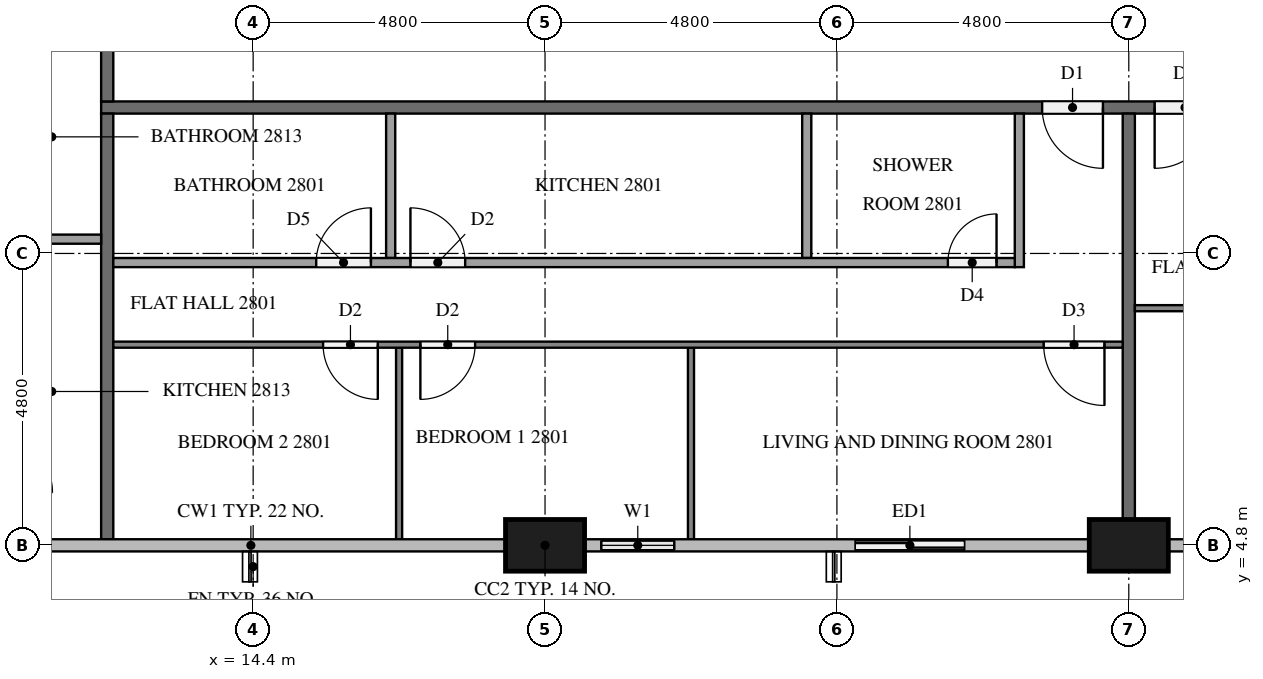
"""IFC4 building model, lengths in metres.
Left out: names, types, materials, properties, quantities, classifications, styles, units other than length and angle.
Written with IfcOpenShell. Run it as: python <this file> out.ifc"""

import sys

from ifc_helpers import new_model, si_unit, direction, frame, frame_2d, origin, origin_2d, place, context, subcontext, project, spatial, rectangle, extrude, element, fill, save


model = new_model("IFC4")
c1 = context("Model", 3, precision=1e-05, world=origin(), true_north=direction((0.0, 1.0)))
c2 = subcontext(c1, "Body", "Model", "MODEL_VIEW")
j1 = project(units=[si_unit("LENGTHUNIT", "METRE"), si_unit("PLANEANGLEUNIT", "RADIAN")], contexts=[c1])
p1 = place(None, origin())
s1 = spatial("IfcSite", under=j1, at=p1, CompositionType="ELEMENT")
p2 = place(p1, origin())
s2 = spatial("IfcBuilding", under=s1, at=p2, CompositionType="ELEMENT")
p3 = place(p2, frame((0.0, 0.0, 110.2)))
s3 = spatial("IfcBuildingStorey", under=s2, at=p3, CompositionType="ELEMENT", Elevation=110.2)
for number, where, z_axis, x_axis in (
    (1, (19.2, 4.8, 0.0), (0.0, 0.0, 1.0), (1.0, 0.0, 0.0)),
    (2, (28.8, 4.8, 0.0), (0.0, 0.0, 1.0), (1.0, 0.0, 0.0)),
):
    element("IfcColumn", number, at=place(p3, frame(where, z_axis=z_axis, x_axis=x_axis)), inside=s3, PredefinedType="COLUMN", context=c2, shape_type="SweptSolid", body=[
        extrude(rectangle(XDim=1.3, YDim=0.85, at=origin_2d()), origin(), (0.0, 0.0, 1.0), 3.1),
    ])
p4 = place(p3, frame((19.85, 4.8, 0.0), z_axis=(0.0, 0.0, 1.0), x_axis=(1.0, 0.0, 0.0)))
e3 = element("IfcWall", 3, at=p4, inside=s3, PredefinedType="SOLIDWALL", context=c2, shape_type="SweptSolid", body=[
    extrude(rectangle(XDim=1.75, YDim=0.15, at=frame_2d((0.875, 0.0))), origin(), (0.0, 0.0, 1.0), 3.1),
])
p5 = place(p4, frame((0.275, 0.0, 0.9)))
e4 = element("IfcOpeningElement", 4, at=p5, cuts=e3, PredefinedType="OPENING", context=c2, shape_type="SweptSolid", body=[
    extrude(rectangle(XDim=1.2, YDim=1.4, at=frame_2d((0.6, 0.7))), frame((0.0, 0.085, 0.0), z_axis=(0.0, -1.0, 0.0), x_axis=(1.0, 0.0, 0.0)), (0.0, 0.0, 1.0), 0.17),
])
p6 = place(p3, frame((24.0, 4.8, 0.0), z_axis=(0.0, 0.0, 1.0), x_axis=(1.0, 0.0, 0.0)))
e5 = element("IfcWall", 5, at=p6, inside=s3, PredefinedType="SOLIDWALL", context=c2, shape_type="SweptSolid", body=[
    extrude(rectangle(XDim=2.4, YDim=0.15, at=frame_2d((1.2, 0.0))), origin(), (0.0, 0.0, 1.0), 3.1),
])
p7 = place(p6, frame((0.3, 0.0, 0.0)))
e6 = element("IfcOpeningElement", 6, at=p7, cuts=e5, PredefinedType="OPENING", context=c2, shape_type="SweptSolid", body=[
    extrude(rectangle(XDim=1.8, YDim=2.4, at=frame_2d((0.9, 1.2))), frame((0.0, 0.085, 0.0), z_axis=(0.0, -1.0, 0.0), x_axis=(1.0, 0.0, 0.0)), (0.0, 0.0, 1.0), 0.17),
])
p8 = place(p3, frame((50.5, 12.0, 0.0), z_axis=(0.0, 0.0, 1.0), x_axis=(-1.0, 0.0, 0.0)))
e7 = element("IfcWall", 7, at=p8, inside=s3, PredefinedType="PARTITIONING", context=c2, shape_type="SweptSolid", body=[
    extrude(rectangle(XDim=38.6, YDim=0.2, at=frame_2d((19.3, 0.0))), origin(), (0.0, 0.0, 1.0), 3.1),
])
p9 = place(p8, frame((22.125, 0.0, 0.0)))
e8 = element("IfcOpeningElement", 8, at=p9, cuts=e7, PredefinedType="OPENING", context=c2, shape_type="SweptSolid", body=[
    extrude(rectangle(XDim=1.0, YDim=2.1, at=frame_2d((0.5, 1.05))), frame((0.0, 0.11, 0.0), z_axis=(0.0, -1.0, 0.0), x_axis=(1.0, 0.0, 0.0)), (0.0, 0.0, 1.0), 0.22),
])
p10 = place(p8, frame((20.275, 0.0, 0.0)))
e9 = element("IfcOpeningElement", 9, at=p10, cuts=e7, PredefinedType="OPENING", context=c2, shape_type="SweptSolid", body=[
    extrude(rectangle(XDim=1.0, YDim=2.1, at=frame_2d((0.5, 1.05))), frame((0.0, 0.11, 0.0), z_axis=(0.0, -1.0, 0.0), x_axis=(1.0, 0.0, 0.0)), (0.0, 0.0, 1.0), 0.22),
])
p11 = place(p8, frame((0.525, 0.0, 0.0)))
e10 = element("IfcOpeningElement", 10, at=p11, cuts=e7, PredefinedType="OPENING", context=c2, shape_type="SweptSolid", body=[
    extrude(rectangle(XDim=1.0, YDim=2.1, at=frame_2d((0.5, 1.05))), frame((0.0, 0.11, 0.0), z_axis=(0.0, -1.0, 0.0), x_axis=(1.0, 0.0, 0.0)), (0.0, 0.0, 1.0), 0.22),
])
p12 = place(p3, frame((12.0, 12.1, 0.0), z_axis=(0.0, 0.0, 1.0), x_axis=(0.0, 1.0, 0.0)))
e11 = element("IfcWall", 11, at=p12, inside=s3, PredefinedType="PARTITIONING", context=c2, shape_type="SweptSolid", body=[
    extrude(rectangle(XDim=2.8, YDim=0.2, at=frame_2d((1.4, 0.0))), origin(), (0.0, 0.0, 1.0), 3.1),
])
p13 = place(p12, frame((1.475, 0.0, 0.0)))
e12 = element("IfcOpeningElement", 12, at=p13, cuts=e11, PredefinedType="OPENING", context=c2, shape_type="SweptSolid", body=[
    extrude(rectangle(XDim=1.0, YDim=2.1, at=frame_2d((0.5, 1.05))), frame((0.0, 0.11, 0.0), z_axis=(0.0, -1.0, 0.0), x_axis=(1.0, 0.0, 0.0)), (0.0, 0.0, 1.0), 0.22),
])
p14 = place(p3, frame((28.8, 11.9, 0.0), z_axis=(0.0, 0.0, 1.0), x_axis=(0.0, -1.0, 0.0)))
e13 = element("IfcWall", 13, at=p14, inside=s3, PredefinedType="PARTITIONING", context=c2, shape_type="SweptSolid", body=[
    extrude(rectangle(XDim=6.675, YDim=0.2, at=frame_2d((3.337, 0.0))), origin(), (0.0, 0.0, 1.0), 3.1),
])
p15 = place(p3, frame((12.0, 4.9, 0.0), z_axis=(0.0, 0.0, 1.0), x_axis=(0.0, 1.0, 0.0)))
e14 = element("IfcWall", 14, at=p15, inside=s3, PredefinedType="PARTITIONING", context=c2, shape_type="SweptSolid", body=[
    extrude(rectangle(XDim=7.0, YDim=0.2, at=frame_2d((3.5, 0.0))), origin(), (0.0, 0.0, 1.0), 3.1),
])
for number, where, z_axis, x_axis in (
    (15, (21.6, 8.05, 0.0), (0.0, 0.0, 1.0), (0.0, -1.0, 0.0)),
    (16, (16.8, 8.05, 0.0), (0.0, 0.0, 1.0), (0.0, -1.0, 0.0)),
):
    element("IfcWall", number, at=place(p3, frame(where, z_axis=z_axis, x_axis=x_axis)), inside=s3, PredefinedType="PARTITIONING", context=c2, shape_type="SweptSolid", body=[
        extrude(rectangle(XDim=3.15, YDim=0.1, at=frame_2d((1.575, 0.0))), origin(), (0.0, 0.0, 1.0), 3.1),
    ])
p16 = place(p3, frame((28.7, 8.1, 0.0), z_axis=(0.0, 0.0, 1.0), x_axis=(-1.0, 0.0, 0.0)))
e17 = element("IfcWall", 17, at=p16, inside=s3, PredefinedType="PARTITIONING", context=c2, shape_type="SweptSolid", body=[
    extrude(rectangle(XDim=16.6, YDim=0.1, at=frame_2d((8.3, 0.0))), origin(), (0.0, 0.0, 1.0), 3.1),
])
p17 = place(p16, frame((0.3, 0.0, 0.0)))
e18 = element("IfcOpeningElement", 18, at=p17, cuts=e17, PredefinedType="OPENING", context=c2, shape_type="SweptSolid", body=[
    extrude(rectangle(XDim=1.0, YDim=2.1, at=frame_2d((0.5, 1.05))), frame((0.0, 0.06, 0.0), z_axis=(0.0, -1.0, 0.0), x_axis=(1.0, 0.0, 0.0)), (0.0, 0.0, 1.0), 0.12),
])
p18 = place(p16, frame((10.65, 0.0, 0.0)))
e19 = element("IfcOpeningElement", 19, at=p18, cuts=e17, PredefinedType="OPENING", context=c2, shape_type="SweptSolid", body=[
    extrude(rectangle(XDim=0.9, YDim=2.1, at=frame_2d((0.45, 1.05))), frame((0.0, 0.06, 0.0), z_axis=(0.0, -1.0, 0.0), x_axis=(1.0, 0.0, 0.0)), (0.0, 0.0, 1.0), 0.12),
])
p19 = place(p16, frame((12.25, 0.0, 0.0)))
e20 = element("IfcOpeningElement", 20, at=p19, cuts=e17, PredefinedType="OPENING", context=c2, shape_type="SweptSolid", body=[
    extrude(rectangle(XDim=0.9, YDim=2.1, at=frame_2d((0.45, 1.05))), frame((0.0, 0.06, 0.0), z_axis=(0.0, -1.0, 0.0), x_axis=(1.0, 0.0, 0.0)), (0.0, 0.0, 1.0), 0.12),
])
for number, where, z_axis, x_axis in (
    (21, (23.504, 11.9, 0.0), (0.0, 0.0, 1.0), (0.0, -1.0, 0.0)),
    (22, (16.662, 11.9, 0.0), (0.0, 0.0, 1.0), (0.0, -1.0, 0.0)),
):
    element("IfcWall", number, at=place(p3, frame(where, z_axis=z_axis, x_axis=x_axis)), inside=s3, PredefinedType="PARTITIONING", context=c2, shape_type="SweptSolid", body=[
        extrude(rectangle(XDim=2.375, YDim=0.15, at=frame_2d((1.188, 0.0))), origin(), (0.0, 0.0, 1.0), 3.1),
    ])
p20 = place(p3, frame((27.0, 11.9, 0.0), z_axis=(0.0, 0.0, 1.0), x_axis=(0.0, -1.0, 0.0)))
e23 = element("IfcWall", 23, at=p20, inside=s3, PredefinedType="PARTITIONING", context=c2, shape_type="SweptSolid", body=[
    extrude(rectangle(XDim=2.525, YDim=0.15, at=frame_2d((1.262, 0.0))), origin(), (0.0, 0.0, 1.0), 3.1),
])
p21 = place(p3, frame((12.1, 9.45, 0.0), z_axis=(0.0, 0.0, 1.0), x_axis=(1.0, 0.0, 0.0)))
e24 = element("IfcWall", 24, at=p21, inside=s3, PredefinedType="PARTITIONING", context=c2, shape_type="SweptSolid", body=[
    extrude(rectangle(XDim=14.825, YDim=0.15, at=frame_2d((7.413, 0.0))), origin(), (0.0, 0.0, 1.0), 3.1),
])
p22 = place(p21, frame((13.725, 0.0, 0.0)))
e25 = element("IfcOpeningElement", 25, at=p22, cuts=e24, PredefinedType="OPENING", context=c2, shape_type="SweptSolid", body=[
    extrude(rectangle(XDim=0.8, YDim=2.1, at=frame_2d((0.4, 1.05))), frame((0.0, 0.085, 0.0), z_axis=(0.0, -1.0, 0.0), x_axis=(1.0, 0.0, 0.0)), (0.0, 0.0, 1.0), 0.17),
])
p23 = place(p21, frame((4.886, 0.0, 0.0)))
e26 = element("IfcOpeningElement", 26, at=p23, cuts=e24, PredefinedType="OPENING", context=c2, shape_type="SweptSolid", body=[
    extrude(rectangle(XDim=0.9, YDim=2.1, at=frame_2d((0.45, 1.05))), frame((0.0, 0.085, 0.0), z_axis=(0.0, -1.0, 0.0), x_axis=(1.0, 0.0, 0.0)), (0.0, 0.0, 1.0), 0.17),
])
p24 = place(p21, frame((3.336, 0.0, 0.0)))
e27 = element("IfcOpeningElement", 27, at=p24, cuts=e24, PredefinedType="OPENING", context=c2, shape_type="SweptSolid", body=[
    extrude(rectangle(XDim=0.9, YDim=2.1, at=frame_2d((0.45, 1.05))), frame((0.0, 0.085, 0.0), z_axis=(0.0, -1.0, 0.0), x_axis=(1.0, 0.0, 0.0)), (0.0, 0.0, 1.0), 0.17),
])
p25 = place(p3, frame((38.3, 8.7, 0.0), z_axis=(0.0, 0.0, 1.0), x_axis=(-1.0, 0.0, 0.0)))
e28 = element("IfcWall", 28, at=p25, inside=s3, PredefinedType="PARTITIONING", context=c2, shape_type="SweptSolid", body=[
    extrude(rectangle(XDim=9.4, YDim=0.1, at=frame_2d((4.7, 0.0))), origin(), (0.0, 0.0, 1.0), 3.1),
])
p26 = place(p25, frame((5.05, 0.0, 0.0)))
e29 = element("IfcOpeningElement", 29, at=p26, cuts=e28, PredefinedType="OPENING", context=c2, shape_type="SweptSolid", body=[
    extrude(rectangle(XDim=1.0, YDim=2.1, at=frame_2d((0.5, 1.05))), frame((0.0, 0.06, 0.0), z_axis=(0.0, -1.0, 0.0), x_axis=(1.0, 0.0, 0.0)), (0.0, 0.0, 1.0), 0.12),
])
p27 = place(p25, frame((3.45, 0.0, 0.0)))
e30 = element("IfcOpeningElement", 30, at=p27, cuts=e28, PredefinedType="OPENING", context=c2, shape_type="SweptSolid", body=[
    extrude(rectangle(XDim=0.9, YDim=2.1, at=frame_2d((0.45, 1.05))), frame((0.0, 0.06, 0.0), z_axis=(0.0, -1.0, 0.0), x_axis=(1.0, 0.0, 0.0)), (0.0, 0.0, 1.0), 0.12),
])
p28 = place(p3, frame((11.9, 9.835, 0.0), z_axis=(0.0, 0.0, 1.0), x_axis=(-1.0, 0.0, 0.0)))
e31 = element("IfcWall", 31, at=p28, inside=s3, PredefinedType="PARTITIONING", context=c2, shape_type="SweptSolid", body=[
    extrude(rectangle(XDim=1.625, YDim=0.15, at=frame_2d((0.812, 0.0))), origin(), (0.0, 0.0, 1.0), 3.1),
])
p29 = place(p5, origin())
e32 = element("IfcWindow", 32, at=p29, inside=s3, PartitioningType="SINGLE_PANEL", PredefinedType="WINDOW", context=c2, shape_type="SweptSolid", body=[
    extrude(rectangle(XDim=1.2, YDim=1.4, at=frame_2d((0.6, 0.7))), frame((0.0, 0.03, 0.0), z_axis=(0.0, -1.0, 0.0), x_axis=(1.0, 0.0, 0.0)), (0.0, 0.0, 1.0), 0.06),
])
fill(e4, e32)
p30 = place(p7, origin())
e33 = element("IfcDoor", 33, at=p30, inside=s3, OperationType="SLIDING_TO_LEFT", PredefinedType="DOOR", context=c2, shape_type="SweptSolid", body=[
    extrude(rectangle(XDim=1.8, YDim=2.4, at=frame_2d((0.9, 1.2))), frame((0.0, 0.025, 0.0), z_axis=(0.0, -1.0, 0.0), x_axis=(1.0, 0.0, 0.0)), (0.0, 0.0, 1.0), 0.05),
])
fill(e6, e33)
p31 = place(p9, origin())
e34 = element("IfcDoor", 34, at=p31, inside=s3, OperationType="SINGLE_SWING_LEFT", PredefinedType="DOOR", context=c2, shape_type="SweptSolid", body=[
    extrude(rectangle(XDim=1.0, YDim=2.1, at=frame_2d((0.5, 1.05))), frame((0.0, 0.025, 0.0), z_axis=(0.0, -1.0, 0.0), x_axis=(1.0, 0.0, 0.0)), (0.0, 0.0, 1.0), 0.05),
])
fill(e8, e34)
p32 = place(p10, origin())
e35 = element("IfcDoor", 35, at=p32, inside=s3, OperationType="SINGLE_SWING_RIGHT", PredefinedType="DOOR", context=c2, shape_type="SweptSolid", body=[
    extrude(rectangle(XDim=1.0, YDim=2.1, at=frame_2d((0.5, 1.05))), frame((0.0, 0.025, 0.0), z_axis=(0.0, -1.0, 0.0), x_axis=(1.0, 0.0, 0.0)), (0.0, 0.0, 1.0), 0.05),
])
fill(e9, e35)
p33 = place(p17, origin())
e36 = element("IfcDoor", 36, at=p33, inside=s3, OperationType="SINGLE_SWING_LEFT", PredefinedType="DOOR", context=c2, shape_type="SweptSolid", body=[
    extrude(rectangle(XDim=1.0, YDim=2.1, at=frame_2d((0.5, 1.05))), frame((0.0, 0.025, 0.0), z_axis=(0.0, -1.0, 0.0), x_axis=(1.0, 0.0, 0.0)), (0.0, 0.0, 1.0), 0.05),
])
fill(e18, e36)
p34 = place(p18, origin())
e37 = element("IfcDoor", 37, at=p34, inside=s3, OperationType="SINGLE_SWING_RIGHT", PredefinedType="DOOR", context=c2, shape_type="SweptSolid", body=[
    extrude(rectangle(XDim=0.9, YDim=2.1, at=frame_2d((0.45, 1.05))), frame((0.0, 0.025, 0.0), z_axis=(0.0, -1.0, 0.0), x_axis=(1.0, 0.0, 0.0)), (0.0, 0.0, 1.0), 0.05),
])
fill(e19, e37)
p35 = place(p19, origin())
e38 = element("IfcDoor", 38, at=p35, inside=s3, OperationType="SINGLE_SWING_LEFT", PredefinedType="DOOR", context=c2, shape_type="SweptSolid", body=[
    extrude(rectangle(XDim=0.9, YDim=2.1, at=frame_2d((0.45, 1.05))), frame((0.0, 0.025, 0.0), z_axis=(0.0, -1.0, 0.0), x_axis=(1.0, 0.0, 0.0)), (0.0, 0.0, 1.0), 0.05),
])
fill(e20, e38)
p36 = place(p22, origin())
e39 = element("IfcDoor", 39, at=p36, inside=s3, OperationType="SINGLE_SWING_RIGHT", PredefinedType="DOOR", context=c2, shape_type="SweptSolid", body=[
    extrude(rectangle(XDim=0.8, YDim=2.1, at=frame_2d((0.4, 1.05))), frame((0.0, 0.025, 0.0), z_axis=(0.0, -1.0, 0.0), x_axis=(1.0, 0.0, 0.0)), (0.0, 0.0, 1.0), 0.05),
])
fill(e25, e39)
p37 = place(p23, origin())
e40 = element("IfcDoor", 40, at=p37, inside=s3, OperationType="SINGLE_SWING_LEFT", PredefinedType="DOOR", context=c2, shape_type="SweptSolid", body=[
    extrude(rectangle(XDim=0.9, YDim=2.1, at=frame_2d((0.45, 1.05))), frame((0.0, 0.025, 0.0), z_axis=(0.0, -1.0, 0.0), x_axis=(1.0, 0.0, 0.0)), (0.0, 0.0, 1.0), 0.05),
])
fill(e26, e40)
p38 = place(p24, origin())
e41 = element("IfcDoor", 41, at=p38, inside=s3, OperationType="SINGLE_SWING_RIGHT", PredefinedType="DOOR", context=c2, shape_type="SweptSolid", body=[
    extrude(rectangle(XDim=0.9, YDim=2.1, at=frame_2d((0.45, 1.05))), frame((0.0, 0.025, 0.0), z_axis=(0.0, -1.0, 0.0), x_axis=(1.0, 0.0, 0.0)), (0.0, 0.0, 1.0), 0.05),
])
fill(e27, e41)
save(model, sys.argv[1])
